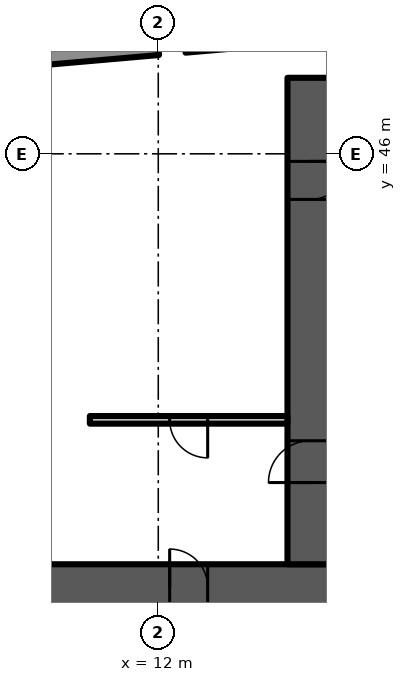
"""IFC4 building model, lengths in metres.
Left out: names, types, materials, properties, quantities, classifications, styles, units other than length and angle.
Written with IfcOpenShell. Run it as: python <this file> out.ifc"""

import sys

from ifc_helpers import new_model, si_unit, direction, frame, frame_2d, origin, place, context, subcontext, project, spatial, rectangle, extrude, element, fill, save


model = new_model("IFC4")
c1 = context("Model", 3, precision=1e-05, world=origin(), true_north=direction((0.0, 1.0)))
c2 = subcontext(c1, "Body", "Model", "MODEL_VIEW")
j1 = project(units=[si_unit("LENGTHUNIT", "METRE"), si_unit("PLANEANGLEUNIT", "RADIAN")], contexts=[c1])
p1 = place(None, origin())
s1 = spatial("IfcSite", under=j1, at=p1, CompositionType="ELEMENT")
p2 = place(p1, origin())
s2 = spatial("IfcBuilding", under=s1, at=p2, CompositionType="ELEMENT")
p3 = place(p2, frame((0.0, 0.0, 27.5)))
s3 = spatial("IfcBuildingStorey", under=s2, at=p3, CompositionType="ELEMENT", Elevation=27.5)
p4 = place(p3, frame((24.0, 49.874, 0.0), z_axis=(0.0, 0.0, 1.0), x_axis=(-0.996195, -0.087145, 0.0)))
e1 = element("IfcWall", 1, at=p4, inside=s3, PredefinedType="SOLIDWALL", context=c2, shape_type="SweptSolid", body=[
    extrude(rectangle(XDim=11.344, YDim=0.45, at=frame_2d((5.672, 0.0))), origin(), (0.0, 0.0, 1.0), 5.2),
])
p5 = place(p4, frame((1.336, 0.0, 1.0)))
e2 = element("IfcOpeningElement", 2, at=p5, cuts=e1, PredefinedType="OPENING", context=c2, shape_type="SweptSolid", body=[
    extrude(rectangle(XDim=3.0, YDim=3.2, at=frame_2d((1.5, 1.6))), frame((0.0, 0.235, 0.0), z_axis=(0.0, -1.0, 0.0), x_axis=(1.0, 0.0, 0.0)), (0.0, 0.0, 1.0), 0.47),
])
p6 = place(p4, frame((7.008, 0.0, 1.0)))
e3 = element("IfcOpeningElement", 3, at=p6, cuts=e1, PredefinedType="OPENING", context=c2, shape_type="SweptSolid", body=[
    extrude(rectangle(XDim=3.0, YDim=3.2, at=frame_2d((1.5, 1.6))), frame((0.0, 0.235, 0.0), z_axis=(0.0, -1.0, 0.0), x_axis=(1.0, 0.0, 0.0)), (0.0, 0.0, 1.0), 0.47),
])
p7 = place(p3, frame((12.0, 48.824, 0.0), z_axis=(0.0, 0.0, 1.0), x_axis=(-0.9962, -0.087124, 0.0)))
e4 = element("IfcWall", 4, at=p7, inside=s3, PredefinedType="SOLIDWALL", context=c2, shape_type="SweptSolid", body=[
    extrude(rectangle(XDim=3.859, YDim=0.45, at=frame_2d((1.929, 0.0))), origin(), (0.0, 0.0, 1.0), 5.2),
])
p8 = place(p3, frame((9.0, 34.6, 0.0), z_axis=(0.0, 0.0, 1.0), x_axis=(1.0, 0.0, 0.0)))
e5 = element("IfcWall", 5, at=p8, inside=s3, PredefinedType="SHEAR", context=c2, shape_type="SweptSolid", body=[
    extrude(rectangle(XDim=56.0, YDim=1.2, at=frame_2d((28.0, 0.0))), origin(), (0.0, 0.0, 1.0), 5.2),
])
p9 = place(p8, frame((3.3, 0.0, 0.0)))
e6 = element("IfcOpeningElement", 6, at=p9, cuts=e5, PredefinedType="OPENING", context=c2, shape_type="SweptSolid", body=[
    extrude(rectangle(XDim=1.0, YDim=2.1, at=frame_2d((0.5, 1.05))), frame((0.0, 0.61, 0.0), z_axis=(0.0, -1.0, 0.0), x_axis=(1.0, 0.0, 0.0)), (0.0, 0.0, 1.0), 1.22),
])
p10 = place(p8, frame((7.867, 0.0, 0.0)))
e7 = element("IfcOpeningElement", 7, at=p10, cuts=e5, PredefinedType="OPENING", context=c2, shape_type="SweptSolid", body=[
    extrude(rectangle(XDim=1.1, YDim=2.1, at=frame_2d((0.55, 1.05))), frame((0.0, 0.61, 0.0), z_axis=(0.0, -1.0, 0.0), x_axis=(1.0, 0.0, 0.0)), (0.0, 0.0, 1.0), 1.22),
])
p11 = place(p8, frame((12.033, 0.0, 0.0)))
e8 = element("IfcOpeningElement", 8, at=p11, cuts=e5, PredefinedType="OPENING", context=c2, shape_type="SweptSolid", body=[
    extrude(rectangle(XDim=1.1, YDim=2.1, at=frame_2d((0.55, 1.05))), frame((0.0, 0.61, 0.0), z_axis=(0.0, -1.0, 0.0), x_axis=(1.0, 0.0, 0.0)), (0.0, 0.0, 1.0), 1.22),
])
p12 = place(p8, frame((9.8, 0.0, 0.0)))
e9 = element("IfcOpeningElement", 9, at=p12, cuts=e5, PredefinedType="OPENING", context=c2, shape_type="SweptSolid", body=[
    extrude(rectangle(XDim=1.4, YDim=2.1, at=frame_2d((0.7, 1.05))), frame((0.0, 0.61, 0.0), z_axis=(0.0, -1.0, 0.0), x_axis=(1.0, 0.0, 0.0)), (0.0, 0.0, 1.0), 1.22),
])
p13 = place(p8, frame((14.65, 0.0, 0.0)))
e10 = element("IfcOpeningElement", 10, at=p13, cuts=e5, PredefinedType="OPENING", context=c2, shape_type="SweptSolid", body=[
    extrude(rectangle(XDim=1.2, YDim=2.1, at=frame_2d((0.6, 1.05))), frame((0.0, 0.61, 0.0), z_axis=(0.0, -1.0, 0.0), x_axis=(1.0, 0.0, 0.0)), (0.0, 0.0, 1.0), 1.22),
])
p14 = place(p8, frame((21.867, 0.0, 0.0)))
e11 = element("IfcOpeningElement", 11, at=p14, cuts=e5, PredefinedType="OPENING", context=c2, shape_type="SweptSolid", body=[
    extrude(rectangle(XDim=1.1, YDim=2.1, at=frame_2d((0.55, 1.05))), frame((0.0, 0.61, 0.0), z_axis=(0.0, -1.0, 0.0), x_axis=(1.0, 0.0, 0.0)), (0.0, 0.0, 1.0), 1.22),
])
p15 = place(p8, frame((26.033, 0.0, 0.0)))
e12 = element("IfcOpeningElement", 12, at=p15, cuts=e5, PredefinedType="OPENING", context=c2, shape_type="SweptSolid", body=[
    extrude(rectangle(XDim=1.1, YDim=2.1, at=frame_2d((0.55, 1.05))), frame((0.0, 0.61, 0.0), z_axis=(0.0, -1.0, 0.0), x_axis=(1.0, 0.0, 0.0)), (0.0, 0.0, 1.0), 1.22),
])
p16 = place(p8, frame((23.8, 0.0, 0.0)))
e13 = element("IfcOpeningElement", 13, at=p16, cuts=e5, PredefinedType="OPENING", context=c2, shape_type="SweptSolid", body=[
    extrude(rectangle(XDim=1.4, YDim=2.1, at=frame_2d((0.7, 1.05))), frame((0.0, 0.61, 0.0), z_axis=(0.0, -1.0, 0.0), x_axis=(1.0, 0.0, 0.0)), (0.0, 0.0, 1.0), 1.22),
])
p17 = place(p8, frame((28.867, 0.0, 0.0)))
e14 = element("IfcOpeningElement", 14, at=p17, cuts=e5, PredefinedType="OPENING", context=c2, shape_type="SweptSolid", body=[
    extrude(rectangle(XDim=1.1, YDim=2.1, at=frame_2d((0.55, 1.05))), frame((0.0, 0.61, 0.0), z_axis=(0.0, -1.0, 0.0), x_axis=(1.0, 0.0, 0.0)), (0.0, 0.0, 1.0), 1.22),
])
p18 = place(p8, frame((33.033, 0.0, 0.0)))
e15 = element("IfcOpeningElement", 15, at=p18, cuts=e5, PredefinedType="OPENING", context=c2, shape_type="SweptSolid", body=[
    extrude(rectangle(XDim=1.1, YDim=2.1, at=frame_2d((0.55, 1.05))), frame((0.0, 0.61, 0.0), z_axis=(0.0, -1.0, 0.0), x_axis=(1.0, 0.0, 0.0)), (0.0, 0.0, 1.0), 1.22),
])
p19 = place(p8, frame((40.15, 0.0, 0.0)))
e16 = element("IfcOpeningElement", 16, at=p19, cuts=e5, PredefinedType="OPENING", context=c2, shape_type="SweptSolid", body=[
    extrude(rectangle(XDim=1.2, YDim=2.1, at=frame_2d((0.6, 1.05))), frame((0.0, 0.61, 0.0), z_axis=(0.0, -1.0, 0.0), x_axis=(1.0, 0.0, 0.0)), (0.0, 0.0, 1.0), 1.22),
])
p20 = place(p8, frame((44.8, 0.0, 0.0)))
e17 = element("IfcOpeningElement", 17, at=p20, cuts=e5, PredefinedType="OPENING", context=c2, shape_type="SweptSolid", body=[
    extrude(rectangle(XDim=1.4, YDim=2.1, at=frame_2d((0.7, 1.05))), frame((0.0, 0.61, 0.0), z_axis=(0.0, -1.0, 0.0), x_axis=(1.0, 0.0, 0.0)), (0.0, 0.0, 1.0), 1.22),
])
p21 = place(p8, frame((49.867, 0.0, 0.0)))
e18 = element("IfcOpeningElement", 18, at=p21, cuts=e5, PredefinedType="OPENING", context=c2, shape_type="SweptSolid", body=[
    extrude(rectangle(XDim=1.1, YDim=2.1, at=frame_2d((0.55, 1.05))), frame((0.0, 0.61, 0.0), z_axis=(0.0, -1.0, 0.0), x_axis=(1.0, 0.0, 0.0)), (0.0, 0.0, 1.0), 1.22),
])
p22 = place(p8, frame((53.5, 0.0, 0.0)))
e19 = element("IfcOpeningElement", 19, at=p22, cuts=e5, PredefinedType="OPENING", context=c2, shape_type="SweptSolid", body=[
    extrude(rectangle(XDim=1.1, YDim=2.1, at=frame_2d((0.55, 1.05))), frame((0.0, 0.61, 0.0), z_axis=(0.0, -1.0, 0.0), x_axis=(1.0, 0.0, 0.0)), (0.0, 0.0, 1.0), 1.22),
])
p23 = place(p8, frame((51.567, 0.0, 0.0)))
e20 = element("IfcOpeningElement", 20, at=p23, cuts=e5, PredefinedType="OPENING", context=c2, shape_type="SweptSolid", body=[
    extrude(rectangle(XDim=1.4, YDim=2.1, at=frame_2d((0.7, 1.05))), frame((0.0, 0.61, 0.0), z_axis=(0.0, -1.0, 0.0), x_axis=(1.0, 0.0, 0.0)), (0.0, 0.0, 1.0), 1.22),
])
p24 = place(p3, frame((16.0, 35.2, 0.0), z_axis=(0.0, 0.0, 1.0), x_axis=(0.0, 1.0, 0.0)))
e21 = element("IfcWall", 21, at=p24, inside=s3, PredefinedType="SHEAR", context=c2, shape_type="SweptSolid", body=[
    extrude(rectangle(XDim=12.8, YDim=1.2, at=frame_2d((6.4, 0.0))), origin(), (0.0, 0.0, 1.0), 5.2),
])
p25 = place(p24, frame((2.15, 0.0, 0.0)))
e22 = element("IfcOpeningElement", 22, at=p25, cuts=e21, PredefinedType="OPENING", context=c2, shape_type="SweptSolid", body=[
    extrude(rectangle(XDim=1.1, YDim=2.1, at=frame_2d((0.55, 1.05))), frame((0.0, 0.61, 0.0), z_axis=(0.0, -1.0, 0.0), x_axis=(1.0, 0.0, 0.0)), (0.0, 0.0, 1.0), 1.22),
])
p26 = place(p24, frame((9.6, 0.0, 0.0)))
e23 = element("IfcOpeningElement", 23, at=p26, cuts=e21, PredefinedType="OPENING", context=c2, shape_type="SweptSolid", body=[
    extrude(rectangle(XDim=1.0, YDim=2.1, at=frame_2d((0.5, 1.05))), frame((0.0, 0.61, 0.0), z_axis=(0.0, -1.0, 0.0), x_axis=(1.0, 0.0, 0.0)), (0.0, 0.0, 1.0), 1.22),
])
p27 = place(p3, frame((10.2, 39.0, 0.0), z_axis=(0.0, 0.0, 1.0), x_axis=(1.0, 0.0, 0.0)))
e24 = element("IfcWall", 24, at=p27, inside=s3, PredefinedType="PARTITIONING", context=c2, shape_type="SweptSolid", body=[
    extrude(rectangle(XDim=5.2, YDim=0.2, at=frame_2d((2.6, 0.0))), origin(), (0.0, 0.0, 1.0), 5.2),
])
p28 = place(p27, frame((2.1, 0.0, 0.0)))
e25 = element("IfcOpeningElement", 25, at=p28, cuts=e24, PredefinedType="OPENING", context=c2, shape_type="SweptSolid", body=[
    extrude(rectangle(XDim=1.0, YDim=2.1, at=frame_2d((0.5, 1.05))), frame((0.0, 0.11, 0.0), z_axis=(0.0, -1.0, 0.0), x_axis=(1.0, 0.0, 0.0)), (0.0, 0.0, 1.0), 0.22),
])
p29 = place(p9, origin())
e26 = element("IfcDoor", 26, at=p29, inside=s3, OperationType="SINGLE_SWING_LEFT", PredefinedType="DOOR", context=c2, shape_type="SweptSolid", body=[
    extrude(rectangle(XDim=1.0, YDim=2.1, at=frame_2d((0.5, 1.05))), frame((0.0, 0.6, 0.0), z_axis=(0.0, -1.0, 0.0), x_axis=(1.0, 0.0, 0.0)), (0.0, 0.0, 1.0), 1.199),
])
fill(e6, e26)
p30 = place(p28, origin())
e27 = element("IfcDoor", 27, at=p30, inside=s3, OperationType="SINGLE_SWING_RIGHT", PredefinedType="DOOR", context=c2, shape_type="SweptSolid", body=[
    extrude(rectangle(XDim=1.0, YDim=2.1, at=frame_2d((0.5, 1.05))), frame((0.0, 0.025, 0.0), z_axis=(0.0, -1.0, 0.0), x_axis=(1.0, 0.0, 0.0)), (0.0, 0.0, 1.0), 0.05),
])
fill(e25, e27)
p31 = place(p25, origin())
e28 = element("IfcDoor", 28, at=p31, inside=s3, OperationType="SINGLE_SWING_LEFT", PredefinedType="DOOR", context=c2, shape_type="SweptSolid", body=[
    extrude(rectangle(XDim=1.1, YDim=2.1, at=frame_2d((0.55, 1.05))), frame((0.0, 0.025, 0.0), z_axis=(0.0, -1.0, 0.0), x_axis=(1.0, 0.0, 0.0)), (0.0, 0.0, 1.0), 0.05),
])
fill(e22, e28)
p32 = place(p26, origin())
e29 = element("IfcDoor", 29, at=p32, inside=s3, OperationType="SINGLE_SWING_RIGHT", PredefinedType="DOOR", context=c2, shape_type="SweptSolid", body=[
    extrude(rectangle(XDim=1.0, YDim=2.1, at=frame_2d((0.5, 1.05))), frame((0.0, 0.6, 0.0), z_axis=(0.0, -1.0, 0.0), x_axis=(1.0, 0.0, 0.0)), (0.0, 0.0, 1.0), 1.199),
])
fill(e23, e29)
save(model, sys.argv[1])
